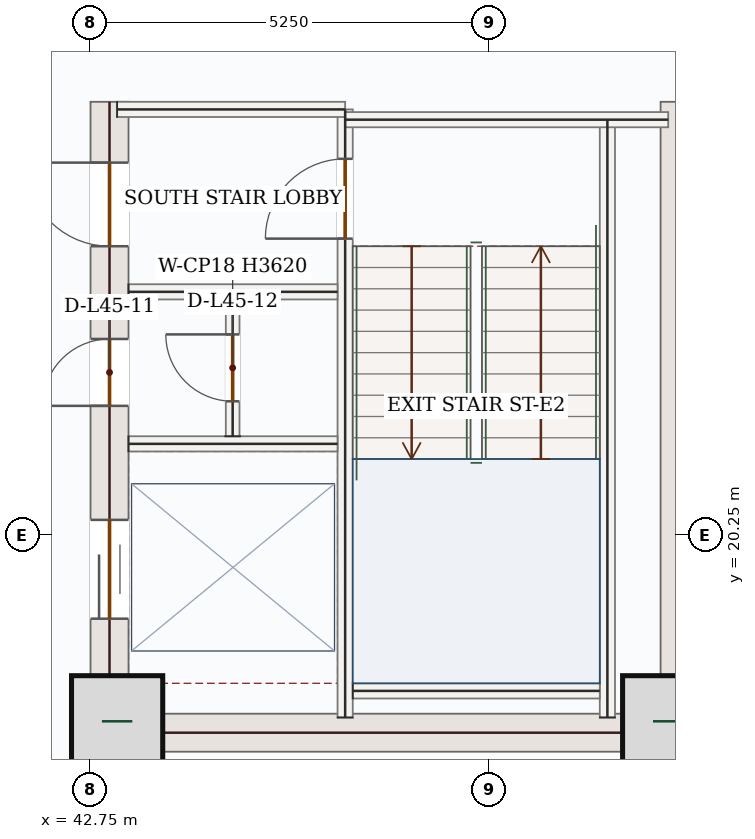
"""IFC4 building model, lengths in metres.
Left out: names, types, materials, properties, quantities, classifications, styles, units other than length and angle.
Written with IfcOpenShell. Run it as: python <this file> out.ifc"""

import sys

from ifc_helpers import new_model, si_unit, direction, frame, frame_2d, origin, origin_2d, place, context, subcontext, project, spatial, rectangle, extrude, source, transform, mapped, element, fill, save


model = new_model("IFC4")
c1 = context("Model", 3, precision=1e-05, world=origin(), true_north=direction((0.0, 1.0)))
c2 = subcontext(c1, "Body", "Model", "MODEL_VIEW")
j1 = project(units=[si_unit("LENGTHUNIT", "METRE"), si_unit("PLANEANGLEUNIT", "RADIAN")], contexts=[c1])
p1 = place(None, origin())
s1 = spatial("IfcSite", under=j1, at=p1, CompositionType="ELEMENT")
p2 = place(p1, origin())
s2 = spatial("IfcBuilding", under=s1, at=p2, CompositionType="ELEMENT")
p3 = place(p2, frame((0.0, 0.0, 194.1)))
s3 = spatial("IfcBuildingStorey", under=s2, at=p3, CompositionType="ELEMENT", Elevation=194.1)
p4 = place(p3, frame((43.0, 17.4, 0.0), z_axis=(0.0, 0.0, 1.0), x_axis=(0.0, 1.0, 0.0)))
e1 = element("IfcWall", 1, at=p4, inside=s3, PredefinedType="SHEAR", context=c2, shape_type="SweptSolid", body=[
    extrude(rectangle(XDim=8.55, YDim=0.5, at=frame_2d((4.275, 0.0))), origin(), (0.0, 0.0, 1.0), 3.62),
])
p5 = place(p4, frame((6.65, 0.0, 0.0)))
e2 = element("IfcOpeningElement", 2, at=p5, cuts=e1, PredefinedType="OPENING", context=c2, shape_type="SweptSolid", body=[
    extrude(rectangle(XDim=1.1, YDim=2.2, at=frame_2d((0.55, 1.1))), frame((0.0, 0.26, 0.0), z_axis=(0.0, -1.0, 0.0), x_axis=(1.0, 0.0, 0.0)), (0.0, 0.0, 1.0), 0.52),
])
p6 = place(p4, frame((1.75, 0.0, 0.0)))
e3 = element("IfcOpeningElement", 3, at=p6, cuts=e1, PredefinedType="OPENING", context=c2, shape_type="SweptSolid", body=[
    extrude(rectangle(XDim=1.3, YDim=2.2, at=frame_2d((0.65, 1.1))), frame((0.0, 0.26, 0.0), z_axis=(0.0, -1.0, 0.0), x_axis=(1.0, 0.0, 0.0)), (0.0, 0.0, 1.0), 0.52),
])
p7 = place(p4, frame((4.55, 0.0, 0.0)))
e4 = element("IfcOpeningElement", 4, at=p7, cuts=e1, PredefinedType="OPENING", context=c2, shape_type="SweptSolid", body=[
    extrude(rectangle(XDim=0.88, YDim=2.1, at=frame_2d((0.44, 1.05))), frame((0.0, 0.26, 0.0), z_axis=(0.0, -1.0, 0.0), x_axis=(1.0, 0.0, 0.0)), (0.0, 0.0, 1.0), 0.52),
])
m1 = source(origin(), c2, "Body", "SweptSolid", [
    extrude(rectangle(XDim=8.55, YDim=0.5, at=frame_2d((4.275, 0.0))), origin(), (0.0, 0.0, 1.0), 3.62),
])
p8 = place(p3, frame((50.5, 17.4, 0.0), z_axis=(0.0, 0.0, 1.0), x_axis=(0.0, 1.0, 0.0)))
e5 = element("IfcWall", 5, at=p8, inside=s3, PredefinedType="SHEAR", context=c2, shape_type="MappedRepresentation", body=[
    mapped(m1, transform((0.0, 0.0, 0.0), x_axis=(1.0, 0.0, 0.0), y_axis=(0.0, 1.0, 0.0), z_axis=(0.0, 0.0, 1.0), scale=1.0)),
])
m2 = source(origin(), c2, "Body", "SweptSolid", [
    extrude(rectangle(XDim=7.0, YDim=0.5, at=frame_2d((3.5, 0.0))), origin(), (0.0, 0.0, 1.0), 3.62),
])
p9 = place(p3, frame((43.25, 17.65, 0.0), z_axis=(0.0, 0.0, 1.0), x_axis=(1.0, 0.0, 0.0)))
e6 = element("IfcWall", 6, at=p9, inside=s3, PredefinedType="SHEAR", context=c2, shape_type="MappedRepresentation", body=[
    mapped(m2, transform((0.0, 0.0, 0.0), x_axis=(1.0, 0.0, 0.0), y_axis=(0.0, 1.0, 0.0), z_axis=(0.0, 0.0, 1.0), scale=1.0)),
])
m3 = source(origin(), c2, "Body", "SweptSolid", [
    extrude(rectangle(XDim=1.2, YDim=1.2, at=origin_2d()), origin(), (0.0, 0.0, 1.0), 3.9),
])
for number, where, z_axis, x_axis in (
    (7, (43.1, 17.8, 0.0), (0.0, 0.0, 1.0), (1.0, 0.0, 0.0)),
    (8, (50.35, 17.8, 0.0), (0.0, 0.0, 1.0), (1.0, 0.0, 0.0)),
):
    element("IfcColumn", number, at=place(p3, frame(where, z_axis=z_axis, x_axis=x_axis)), inside=s3, PredefinedType="COLUMN", context=c2, shape_type="MappedRepresentation", body=[
        mapped(m3, transform((0.0, 0.0, 0.0), x_axis=(1.0, 0.0, 0.0), y_axis=(0.0, 1.0, 0.0), z_axis=(0.0, 0.0, 1.0), scale=1.0)),
    ])
p10 = place(p3, frame((53.06, 18.458, 0.0), z_axis=(0.0, 0.0, 1.0), x_axis=(-0.707106781187, -0.707106781187, 0.0)))
e9 = element("IfcWall", 9, at=p10, inside=s3, PredefinedType="SOLIDWALL", context=c2, shape_type="SweptSolid", body=[
    extrude(rectangle(XDim=5.258, YDim=0.28, at=frame_2d((2.629, 0.0))), origin(), (0.0, 0.0, 1.0), 3.62),
])
p11 = place(p10, frame((1.729, 0.0, 0.85)))
e10 = element("IfcOpeningElement", 10, at=p11, cuts=e9, PredefinedType="OPENING", context=c2, shape_type="SweptSolid", body=[
    extrude(rectangle(XDim=1.8, YDim=1.75, at=frame_2d((0.9, 0.875))), frame((0.0, 0.15, 0.0), z_axis=(0.0, -1.0, 0.0), x_axis=(1.0, 0.0, 0.0)), (0.0, 0.0, 1.0), 0.3),
])
m4 = source(origin(), c2, "Body", "SweptSolid", [
    extrude(rectangle(XDim=7.87, YDim=0.2, at=frame_2d((3.935, 0.0))), origin(), (0.0, 0.0, 1.0), 3.62),
])
p12 = place(p3, frame((49.55, 17.85, 0.0), z_axis=(0.0, 0.0, 1.0), x_axis=(0.0, 1.0, 0.0)))
e11 = element("IfcWall", 11, at=p12, inside=s3, PredefinedType="SOLIDWALL", context=c2, shape_type="MappedRepresentation", body=[
    mapped(m4, transform((0.0, 0.0, 0.0), x_axis=(1.0, 0.0, 0.0), y_axis=(0.0, 1.0, 0.0), z_axis=(0.0, 0.0, 1.0), scale=1.0)),
])
p13 = place(p3, frame((46.1, 17.85, 0.0), z_axis=(0.0, 0.0, 1.0), x_axis=(0.0, 1.0, 0.0)))
e12 = element("IfcWall", 12, at=p13, inside=s3, PredefinedType="SOLIDWALL", context=c2, shape_type="SweptSolid", body=[
    extrude(rectangle(XDim=8.0, YDim=0.2, at=frame_2d((4.0, 0.0))), origin(), (0.0, 0.0, 1.0), 3.62),
])
p14 = place(p13, frame((6.3, 0.0, 0.0)))
e13 = element("IfcOpeningElement", 13, at=p14, cuts=e12, PredefinedType="OPENING", context=c2, shape_type="SweptSolid", body=[
    extrude(rectangle(XDim=1.05, YDim=2.15, at=frame_2d((0.525, 1.075))), frame((0.0, 0.11, 0.0), z_axis=(0.0, -1.0, 0.0), x_axis=(1.0, 0.0, 0.0)), (0.0, 0.0, 1.0), 0.22),
])
m5 = source(origin(), c2, "Body", "SweptSolid", [
    extrude(rectangle(XDim=3.0, YDim=0.2, at=frame_2d((1.5, 0.0))), origin(), (0.0, 0.0, 1.0), 3.62),
])
p15 = place(p3, frame((43.1, 25.85, 0.0), z_axis=(0.0, 0.0, 1.0), x_axis=(1.0, 0.0, 0.0)))
e14 = element("IfcWall", 14, at=p15, inside=s3, PredefinedType="SOLIDWALL", context=c2, shape_type="MappedRepresentation", body=[
    mapped(m5, transform((0.0, 0.0, 0.0), x_axis=(1.0, 0.0, 0.0), y_axis=(0.0, 1.0, 0.0), z_axis=(0.0, 0.0, 1.0), scale=1.0)),
])
m6 = source(origin(), c2, "Body", "SweptSolid", [
    extrude(rectangle(XDim=4.25, YDim=0.2, at=frame_2d((2.125, 0.0))), origin(), (0.0, 0.0, 1.0), 3.62),
])
p16 = place(p3, frame((46.1, 25.715, 0.0), z_axis=(0.0, 0.0, 1.0), x_axis=(1.0, 0.0, 0.0)))
e15 = element("IfcWall", 15, at=p16, inside=s3, PredefinedType="SOLIDWALL", context=c2, shape_type="MappedRepresentation", body=[
    mapped(m6, transform((0.0, 0.0, 0.0), x_axis=(1.0, 0.0, 0.0), y_axis=(0.0, 1.0, 0.0), z_axis=(0.0, 0.0, 1.0), scale=1.0)),
])
m7 = source(origin(), c2, "Body", "SweptSolid", [
    extrude(rectangle(XDim=3.25, YDim=0.2, at=frame_2d((1.625, 0.0))), origin(), (0.0, 0.0, 1.0), 3.62),
])
p17 = place(p3, frame((46.2, 18.2, 0.0), z_axis=(0.0, 0.0, 1.0), x_axis=(1.0, 0.0, 0.0)))
e16 = element("IfcWall", 16, at=p17, inside=s3, PredefinedType="SOLIDWALL", context=c2, shape_type="MappedRepresentation", body=[
    mapped(m7, transform((0.0, 0.0, 0.0), x_axis=(1.0, 0.0, 0.0), y_axis=(0.0, 1.0, 0.0), z_axis=(0.0, 0.0, 1.0), scale=1.0)),
])
m8 = source(origin(), c2, "Body", "SweptSolid", [
    extrude(rectangle(XDim=2.75, YDim=0.2, at=frame_2d((1.375, 0.0))), origin(), (0.0, 0.0, 1.0), 3.62),
])
for number, where, z_axis, x_axis in (
    (17, (43.25, 23.45, 0.0), (0.0, 0.0, 1.0), (1.0, 0.0, 0.0)),
    (18, (43.25, 21.45, 0.0), (0.0, 0.0, 1.0), (1.0, 0.0, 0.0)),
):
    element("IfcWall", number, at=place(p3, frame(where, z_axis=z_axis, x_axis=x_axis)), inside=s3, PredefinedType="SOLIDWALL", context=c2, shape_type="MappedRepresentation", body=[
        mapped(m8, transform((0.0, 0.0, 0.0), x_axis=(1.0, 0.0, 0.0), y_axis=(0.0, 1.0, 0.0), z_axis=(0.0, 0.0, 1.0), scale=1.0)),
    ])
p18 = place(p3, frame((44.62, 21.55, 0.0), z_axis=(0.0, 0.0, 1.0), x_axis=(0.0, 1.0, 0.0)))
e19 = element("IfcWall", 19, at=p18, inside=s3, PredefinedType="PARTITIONING", context=c2, shape_type="SweptSolid", body=[
    extrude(rectangle(XDim=1.8, YDim=0.18, at=frame_2d((0.9, 0.0))), origin(), (0.0, 0.0, 1.0), 3.62),
])
p19 = place(p18, frame((0.46, 0.0, 0.0)))
e20 = element("IfcOpeningElement", 20, at=p19, cuts=e19, PredefinedType="OPENING", context=c2, shape_type="SweptSolid", body=[
    extrude(rectangle(XDim=0.88, YDim=2.1, at=frame_2d((0.44, 1.05))), frame((0.0, 0.1, 0.0), z_axis=(0.0, -1.0, 0.0), x_axis=(1.0, 0.0, 0.0)), (0.0, 0.0, 1.0), 0.2),
])
m9 = source(origin(), c2, "Body", "SweptSolid", [
    extrude(rectangle(XDim=1.05, YDim=2.15, at=frame_2d((0.525, 1.075))), frame((0.0, 0.025, 0.0), z_axis=(0.0, -1.0, 0.0), x_axis=(1.0, 0.0, 0.0)), (0.0, 0.0, 1.0), 0.05),
])
p20 = place(p14, origin())
e21 = element("IfcDoor", 21, at=p20, inside=s3, OperationType="SINGLE_SWING_LEFT", PredefinedType="DOOR", context=c2, shape_type="MappedRepresentation", body=[
    mapped(m9, transform((0.0, 0.0, 0.0), x_axis=(1.0, 0.0, 0.0), y_axis=(0.0, 1.0, 0.0), z_axis=(0.0, 0.0, 1.0), scale=1.0)),
])
fill(e13, e21)
m10 = source(origin(), c2, "Body", "SweptSolid", [
    extrude(rectangle(XDim=1.1, YDim=2.2, at=frame_2d((0.55, 1.1))), frame((0.0, 0.025, 0.0), z_axis=(0.0, -1.0, 0.0), x_axis=(1.0, 0.0, 0.0)), (0.0, 0.0, 1.0), 0.05),
])
p21 = place(p5, origin())
e22 = element("IfcDoor", 22, at=p21, inside=s3, OperationType="SINGLE_SWING_RIGHT", PredefinedType="DOOR", context=c2, shape_type="MappedRepresentation", body=[
    mapped(m10, transform((0.0, 0.0, 0.0), x_axis=(1.0, 0.0, 0.0), y_axis=(0.0, 1.0, 0.0), z_axis=(0.0, 0.0, 1.0), scale=1.0)),
])
fill(e2, e22)
m11 = source(origin(), c2, "Body", "SweptSolid", [
    extrude(rectangle(XDim=1.3, YDim=2.2, at=frame_2d((0.65, 1.1))), frame((0.0, 0.025, 0.0), z_axis=(0.0, -1.0, 0.0), x_axis=(1.0, 0.0, 0.0)), (0.0, 0.0, 1.0), 0.05),
])
p22 = place(p6, origin())
e23 = element("IfcDoor", 23, at=p22, inside=s3, OperationType="DOUBLE_DOOR_SLIDING", PredefinedType="DOOR", context=c2, shape_type="MappedRepresentation", body=[
    mapped(m11, transform((0.0, 0.0, 0.0), x_axis=(1.0, 0.0, 0.0), y_axis=(0.0, 1.0, 0.0), z_axis=(0.0, 0.0, 1.0), scale=1.0)),
])
fill(e3, e23)
m12 = source(origin(), c2, "Body", "SweptSolid", [
    extrude(rectangle(XDim=0.88, YDim=2.1, at=frame_2d((0.44, 1.05))), frame((0.0, 0.025, 0.0), z_axis=(0.0, -1.0, 0.0), x_axis=(1.0, 0.0, 0.0)), (0.0, 0.0, 1.0), 0.05),
])
p23 = place(p7, origin())
e24 = element("IfcDoor", 24, at=p23, inside=s3, OperationType="SINGLE_SWING_LEFT", PredefinedType="DOOR", context=c2, shape_type="MappedRepresentation", body=[
    mapped(m12, transform((0.0, 0.0, 0.0), x_axis=(1.0, 0.0, 0.0), y_axis=(0.0, 1.0, 0.0), z_axis=(0.0, 0.0, 1.0), scale=1.0)),
])
fill(e4, e24)
p24 = place(p19, origin())
e25 = element("IfcDoor", 25, at=p24, inside=s3, OperationType="SINGLE_SWING_RIGHT", PredefinedType="DOOR", context=c2, shape_type="MappedRepresentation", body=[
    mapped(m12, transform((0.0, 0.0, 0.0), x_axis=(1.0, 0.0, 0.0), y_axis=(0.0, 1.0, 0.0), z_axis=(0.0, 0.0, 1.0), scale=1.0)),
])
fill(e20, e25)
save(model, sys.argv[1])
